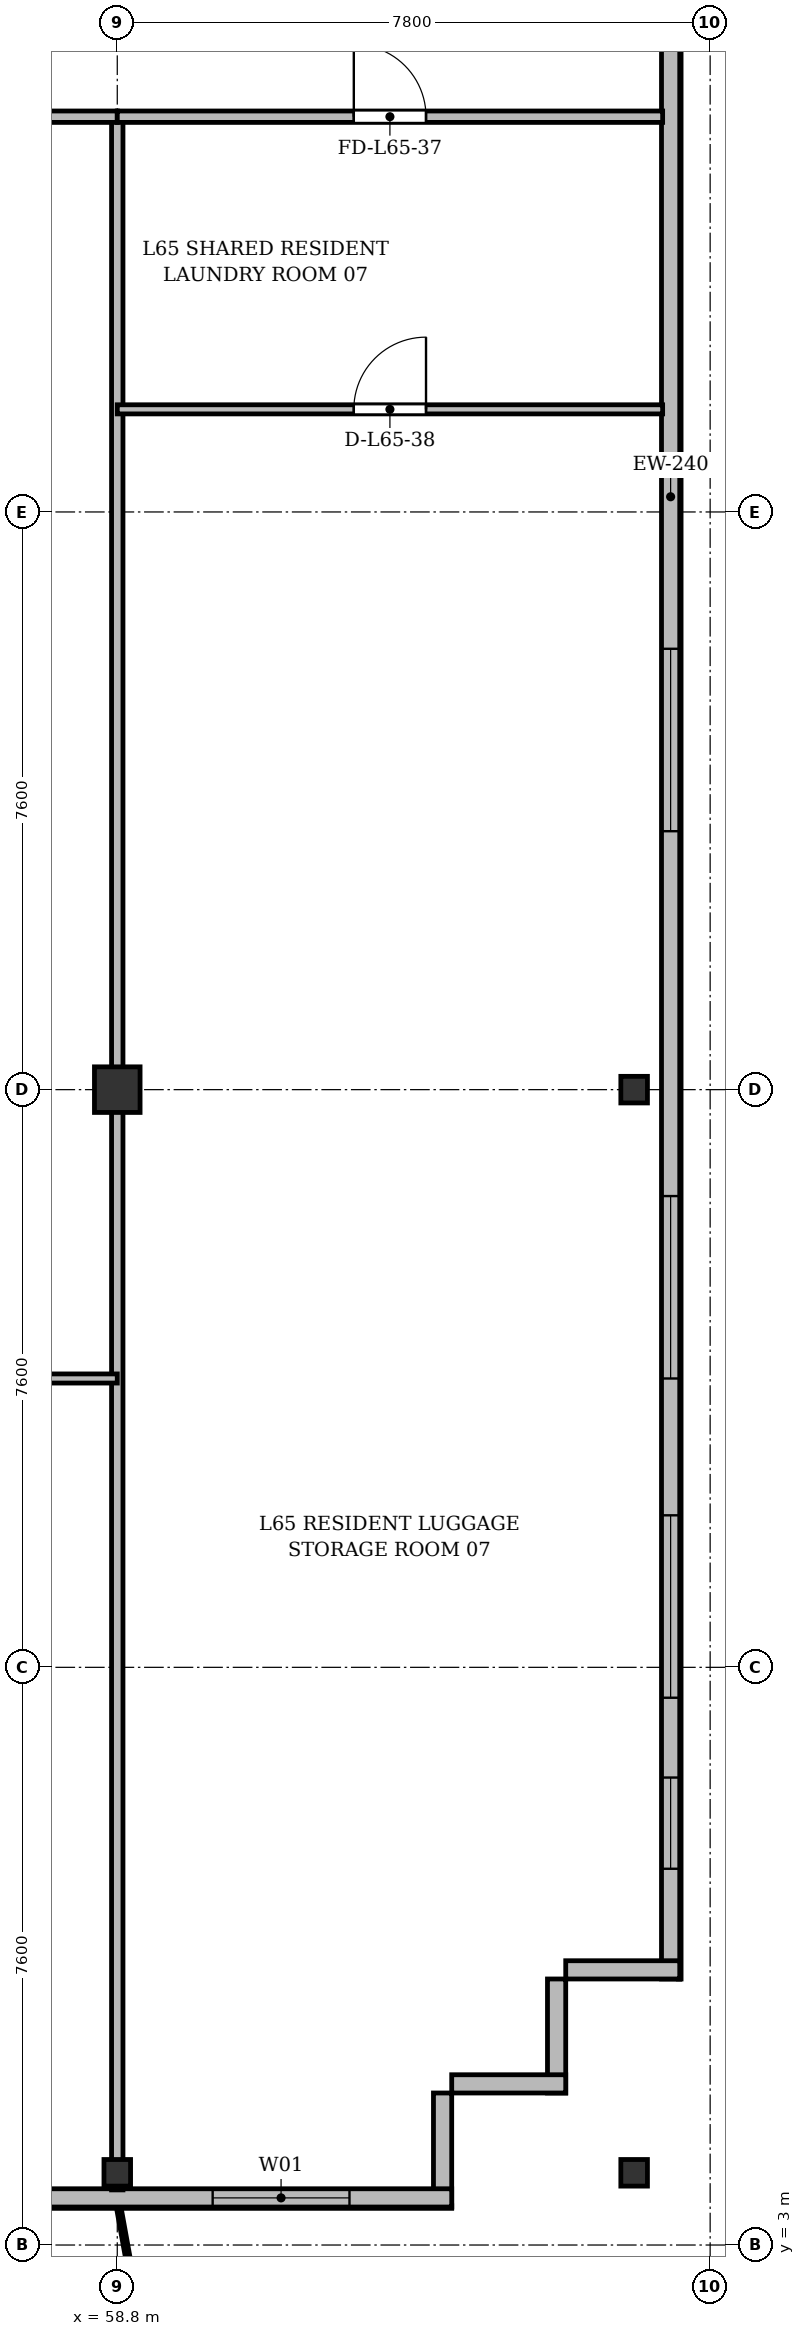
"""IFC4 building model, lengths in metres.
Left out: names, types, materials, properties, quantities, classifications, styles, units other than length and angle.
Written with IfcOpenShell. Run it as: python <this file> out.ifc"""

import sys

from ifc_helpers import new_model, si_unit, direction, frame, frame_2d, origin, origin_2d, place, context, subcontext, project, spatial, rectangle, i_section, extrude, source, transform, mapped, element, fill, save


model = new_model("IFC4")
c1 = context("Model", 3, precision=1e-05, world=origin(), true_north=direction((0.0, 1.0)))
c2 = subcontext(c1, "Body", "Model", "MODEL_VIEW")
j1 = project(units=[si_unit("LENGTHUNIT", "METRE"), si_unit("PLANEANGLEUNIT", "RADIAN")], contexts=[c1])
p1 = place(None, origin())
s1 = spatial("IfcSite", under=j1, at=p1, CompositionType="ELEMENT")
p2 = place(p1, origin())
s2 = spatial("IfcBuilding", under=s1, at=p2, CompositionType="ELEMENT")
p3 = place(p2, frame((0.0, 0.0, 252.3)))
s3 = spatial("IfcBuildingStorey", under=s2, at=p3, CompositionType="ELEMENT", Elevation=252.3)
m1 = source(origin(), c2, "Body", "SweptSolid", [
    extrude(i_section(OverallWidth=0.35, OverallDepth=0.35, WebThickness=0.018, FlangeThickness=0.028, at=origin_2d()), origin(), (0.0, 0.0, 1.0), 3.6),
])
p4 = place(p3, frame((58.8, 3.95, 0.0), z_axis=(0.0, 0.0, 1.0), x_axis=(1.0, 0.0, 0.0)))
e1 = element("IfcColumn", 1, at=p4, inside=s3, PredefinedType="COLUMN", context=c2, shape_type="MappedRepresentation", body=[
    mapped(m1, transform((0.0, 0.0, 0.0), x_axis=(1.0, 0.0, 0.0), y_axis=(0.0, 1.0, 0.0), z_axis=(0.0, 0.0, 1.0), scale=1.0)),
])
m2 = source(origin(), c2, "Body", "SweptSolid", [
    extrude(rectangle(XDim=0.6, YDim=0.6, at=origin_2d()), origin(), (0.0, 0.0, 1.0), 3.6),
])
p5 = place(p3, frame((58.8, 18.2, 0.0), z_axis=(0.0, 0.0, 1.0), x_axis=(1.0, 0.0, 0.0)))
e2 = element("IfcColumn", 2, at=p5, inside=s3, PredefinedType="COLUMN", context=c2, shape_type="MappedRepresentation", body=[
    mapped(m2, transform((0.0, 0.0, 0.0), x_axis=(1.0, 0.0, 0.0), y_axis=(0.0, 1.0, 0.0), z_axis=(0.0, 0.0, 1.0), scale=1.0)),
])
for number, where, z_axis, x_axis in (
    (3, (65.6, 3.95, 0.0), (0.0, 0.0, 1.0), (1.0, 0.0, 0.0)),
    (4, (65.6, 18.2, 0.0), (0.0, 0.0, 1.0), (1.0, 0.0, 0.0)),
):
    element("IfcColumn", number, at=place(p3, frame(where, z_axis=z_axis, x_axis=x_axis)), inside=s3, PredefinedType="COLUMN", context=c2, shape_type="MappedRepresentation", body=[
        mapped(m1, transform((0.0, 0.0, 0.0), x_axis=(1.0, 0.0, 0.0), y_axis=(0.0, 1.0, 0.0), z_axis=(0.0, 0.0, 1.0), scale=1.0)),
    ])
p6 = place(p3, frame((66.08, 45.5, 0.0), z_axis=(0.0, 0.0, 1.0), x_axis=(0.0, -1.0, 0.0)))
e5 = element("IfcWall", 5, at=p6, inside=s3, PredefinedType="SOLIDWALL", context=c2, shape_type="SweptSolid", body=[
    extrude(rectangle(XDim=39.0, YDim=0.24, at=frame_2d((19.5, 0.0))), origin(), (0.0, 0.0, 1.0), 3.37),
])
p7 = place(p6, frame((36.35, 0.0, 0.92)))
e6 = element("IfcOpeningElement", 6, at=p7, cuts=e5, PredefinedType="OPENING", context=c2, shape_type="SweptSolid", body=[
    extrude(rectangle(XDim=1.2, YDim=1.65, at=frame_2d((0.6, 0.825))), frame((0.0, 0.13, 0.0), z_axis=(0.0, -1.0, 0.0), x_axis=(1.0, 0.0, 0.0)), (0.0, 0.0, 1.0), 0.26),
])
p8 = place(p6, frame((32.9, 0.0, 0.92)))
e7 = element("IfcOpeningElement", 7, at=p8, cuts=e5, PredefinedType="OPENING", context=c2, shape_type="SweptSolid", body=[
    extrude(rectangle(XDim=2.4, YDim=2.1, at=frame_2d((1.2, 1.05))), frame((0.0, 0.13, 0.0), z_axis=(0.0, -1.0, 0.0), x_axis=(1.0, 0.0, 0.0)), (0.0, 0.0, 1.0), 0.26),
])
p9 = place(p6, frame((28.7, 0.0, 0.92)))
e8 = element("IfcOpeningElement", 8, at=p9, cuts=e5, PredefinedType="OPENING", context=c2, shape_type="SweptSolid", body=[
    extrude(rectangle(XDim=2.4, YDim=2.1, at=frame_2d((1.2, 1.05))), frame((0.0, 0.13, 0.0), z_axis=(0.0, -1.0, 0.0), x_axis=(1.0, 0.0, 0.0)), (0.0, 0.0, 1.0), 0.26),
])
p10 = place(p6, frame((21.5, 0.0, 0.92)))
e9 = element("IfcOpeningElement", 9, at=p10, cuts=e5, PredefinedType="OPENING", context=c2, shape_type="SweptSolid", body=[
    extrude(rectangle(XDim=2.4, YDim=2.1, at=frame_2d((1.2, 1.05))), frame((0.0, 0.13, 0.0), z_axis=(0.0, -1.0, 0.0), x_axis=(1.0, 0.0, 0.0)), (0.0, 0.0, 1.0), 0.26),
])
p11 = place(p6, frame((7.5, 0.0, 0.92)))
e10 = element("IfcOpeningElement", 10, at=p11, cuts=e5, PredefinedType="OPENING", context=c2, shape_type="SweptSolid", body=[
    extrude(rectangle(XDim=2.4, YDim=2.1, at=frame_2d((1.2, 1.05))), frame((0.0, 0.13, 0.0), z_axis=(0.0, -1.0, 0.0), x_axis=(1.0, 0.0, 0.0)), (0.0, 0.0, 1.0), 0.26),
])
p12 = place(p6, frame((4.5, 0.0, 0.92)))
e11 = element("IfcOpeningElement", 11, at=p12, cuts=e5, PredefinedType="OPENING", context=c2, shape_type="SweptSolid", body=[
    extrude(rectangle(XDim=1.2, YDim=1.65, at=frame_2d((0.6, 0.825))), frame((0.0, 0.13, 0.0), z_axis=(0.0, -1.0, 0.0), x_axis=(1.0, 0.0, 0.0)), (0.0, 0.0, 1.0), 0.26),
])
p13 = place(p6, frame((1.15, 0.0, 0.92)))
e12 = element("IfcOpeningElement", 12, at=p13, cuts=e5, PredefinedType="OPENING", context=c2, shape_type="SweptSolid", body=[
    extrude(rectangle(XDim=1.2, YDim=1.65, at=frame_2d((0.6, 0.825))), frame((0.0, 0.13, 0.0), z_axis=(0.0, -1.0, 0.0), x_axis=(1.0, 0.0, 0.0)), (0.0, 0.0, 1.0), 0.26),
])
p14 = place(p3, frame((66.2, 6.62, 0.0), z_axis=(0.0, 0.0, 1.0), x_axis=(-1.0, 0.0, 0.0)))
e13 = element("IfcWall", 13, at=p14, inside=s3, PredefinedType="SOLIDWALL", context=c2, shape_type="SweptSolid", body=[
    extrude(rectangle(XDim=1.5, YDim=0.24, at=frame_2d((0.75, 0.0))), origin(), (0.0, 0.0, 1.0), 2.87),
])
for number, where, z_axis, x_axis in (
    (14, (64.58, 6.5, 0.0), (0.0, 0.0, 1.0), (0.0, -1.0, 0.0)),
    (15, (64.7, 5.12, 0.0), (0.0, 0.0, 1.0), (-1.0, 0.0, 0.0)),
):
    element("IfcWall", number, at=place(p3, frame(where, z_axis=z_axis, x_axis=x_axis)), inside=s3, PredefinedType="SOLIDWALL", context=c2, shape_type="SweptSolid", body=[
        extrude(rectangle(XDim=1.5, YDim=0.24, at=frame_2d((0.75, 0.0))), origin(), (0.0, 0.0, 1.0), 3.37),
    ])
p15 = place(p3, frame((63.08, 5.0, 0.0), z_axis=(0.0, 0.0, 1.0), x_axis=(0.0, -1.0, 0.0)))
e16 = element("IfcWall", 16, at=p15, inside=s3, PredefinedType="SOLIDWALL", context=c2, shape_type="SweptSolid", body=[
    extrude(rectangle(XDim=1.5, YDim=0.24, at=frame_2d((0.75, 0.0))), origin(), (0.0, 0.0, 1.0), 2.92),
])
p16 = place(p3, frame((63.2, 3.62, 0.0), z_axis=(0.0, 0.0, 1.0), x_axis=(-1.0, 0.0, 0.0)))
e17 = element("IfcWall", 17, at=p16, inside=s3, PredefinedType="SOLIDWALL", context=c2, shape_type="SweptSolid", body=[
    extrude(rectangle(XDim=52.0, YDim=0.24, at=frame_2d((26.0, 0.0))), origin(), (0.0, 0.0, 1.0), 3.37),
])
p17 = place(p16, frame((1.345, 0.0, 0.9)))
e18 = element("IfcOpeningElement", 18, at=p17, cuts=e17, PredefinedType="OPENING", context=c2, shape_type="SweptSolid", body=[
    extrude(rectangle(XDim=1.8, YDim=1.8, at=frame_2d((0.9, 0.9))), frame((0.0, 0.13, 0.0), z_axis=(0.0, -1.0, 0.0), x_axis=(1.0, 0.0, 0.0)), (0.0, 0.0, 1.0), 0.26),
])
p18 = place(p16, frame((7.2, 0.0, 0.9)))
e19 = element("IfcOpeningElement", 19, at=p18, cuts=e17, PredefinedType="OPENING", context=c2, shape_type="SweptSolid", body=[
    extrude(rectangle(XDim=2.2, YDim=1.8, at=frame_2d((1.1, 0.9))), frame((0.0, 0.13, 0.0), z_axis=(0.0, -1.0, 0.0), x_axis=(1.0, 0.0, 0.0)), (0.0, 0.0, 1.0), 0.26),
])
p19 = place(p16, frame((14.017, 0.0, 0.0)))
e20 = element("IfcOpeningElement", 20, at=p19, cuts=e17, PredefinedType="OPENING", context=c2, shape_type="SweptSolid", body=[
    extrude(rectangle(XDim=1.2, YDim=2.2, at=frame_2d((0.6, 1.1))), frame((0.0, 0.13, 0.0), z_axis=(0.0, -1.0, 0.0), x_axis=(1.0, 0.0, 0.0)), (0.0, 0.0, 1.0), 0.26),
])
p20 = place(p16, frame((25.0, 0.0, 0.9)))
e21 = element("IfcOpeningElement", 21, at=p20, cuts=e17, PredefinedType="OPENING", context=c2, shape_type="SweptSolid", body=[
    extrude(rectangle(XDim=2.0, YDim=1.95, at=frame_2d((1.0, 0.975))), frame((0.0, 0.13, 0.0), z_axis=(0.0, -1.0, 0.0), x_axis=(1.0, 0.0, 0.0)), (0.0, 0.0, 1.0), 0.26),
])
p21 = place(p16, frame((35.375, 0.0, 0.9)))
e22 = element("IfcOpeningElement", 22, at=p21, cuts=e17, PredefinedType="OPENING", context=c2, shape_type="SweptSolid", body=[
    extrude(rectangle(XDim=1.65, YDim=1.85, at=frame_2d((0.825, 0.925))), frame((0.0, 0.13, 0.0), z_axis=(0.0, -1.0, 0.0), x_axis=(1.0, 0.0, 0.0)), (0.0, 0.0, 1.0), 0.26),
])
p22 = place(p16, frame((45.302, 0.0, 0.0)))
e23 = element("IfcOpeningElement", 23, at=p22, cuts=e17, PredefinedType="OPENING", context=c2, shape_type="SweptSolid", body=[
    extrude(rectangle(XDim=1.2, YDim=2.2, at=frame_2d((0.6, 1.1))), frame((0.0, 0.13, 0.0), z_axis=(0.0, -1.0, 0.0), x_axis=(1.0, 0.0, 0.0)), (0.0, 0.0, 1.0), 0.26),
])
p23 = place(p16, frame((48.655, 0.0, 0.9)))
e24 = element("IfcOpeningElement", 24, at=p23, cuts=e17, PredefinedType="OPENING", context=c2, shape_type="SweptSolid", body=[
    extrude(rectangle(XDim=2.2, YDim=1.8, at=frame_2d((1.1, 0.9))), frame((0.0, 0.13, 0.0), z_axis=(0.0, -1.0, 0.0), x_axis=(1.0, 0.0, 0.0)), (0.0, 0.0, 1.0), 0.26),
])
p24 = place(p3, frame((58.8, 3.725, 0.0), z_axis=(0.0, 0.0, 1.0), x_axis=(0.0, 1.0, 0.0)))
e25 = element("IfcWall", 25, at=p24, inside=s3, PredefinedType="PARTITIONING", context=c2, shape_type="SweptSolid", body=[
    extrude(rectangle(XDim=27.275, YDim=0.15, at=frame_2d((13.637, 0.0))), origin(), (0.0, 0.0, 1.0), 2.87),
])
p25 = place(p3, frame((51.0, 31.0, 0.0), z_axis=(0.0, 0.0, 1.0), x_axis=(1.0, 0.0, 0.0)))
e26 = element("IfcWall", 26, at=p25, inside=s3, PredefinedType="PARTITIONING", context=c2, shape_type="SweptSolid", body=[
    extrude(rectangle(XDim=7.8, YDim=0.15, at=frame_2d((3.9, 0.0))), origin(), (0.0, 0.0, 1.0), 2.87),
])
p26 = place(p25, frame((3.333, 0.0, 0.0)))
e27 = element("IfcOpeningElement", 27, at=p26, cuts=e26, PredefinedType="OPENING", context=c2, shape_type="SweptSolid", body=[
    extrude(rectangle(XDim=0.95, YDim=2.15, at=frame_2d((0.475, 1.075))), frame((0.0, 0.085, 0.0), z_axis=(0.0, -1.0, 0.0), x_axis=(1.0, 0.0, 0.0)), (0.0, 0.0, 1.0), 0.17),
])
p27 = place(p3, frame((51.0, 14.4, 0.0), z_axis=(0.0, 0.0, 1.0), x_axis=(1.0, 0.0, 0.0)))
e28 = element("IfcWall", 28, at=p27, inside=s3, PredefinedType="PARTITIONING", context=c2, shape_type="SweptSolid", body=[
    extrude(rectangle(XDim=7.8, YDim=0.12, at=frame_2d((3.9, 0.0))), origin(), (0.0, 0.0, 1.0), 2.87),
])
p28 = place(p27, frame((3.333, 0.0, 0.0)))
e29 = element("IfcOpeningElement", 29, at=p28, cuts=e28, PredefinedType="OPENING", context=c2, shape_type="SweptSolid", body=[
    extrude(rectangle(XDim=0.95, YDim=2.15, at=frame_2d((0.475, 1.075))), frame((0.0, 0.07, 0.0), z_axis=(0.0, -1.0, 0.0), x_axis=(1.0, 0.0, 0.0)), (0.0, 0.0, 1.0), 0.14),
])
p29 = place(p3, frame((58.8, 31.0, 0.0), z_axis=(0.0, 0.0, 1.0), x_axis=(1.0, 0.0, 0.0)))
e30 = element("IfcWall", 30, at=p29, inside=s3, PredefinedType="PARTITIONING", context=c2, shape_type="SweptSolid", body=[
    extrude(rectangle(XDim=7.175, YDim=0.15, at=frame_2d((3.587, 0.0))), origin(), (0.0, 0.0, 1.0), 2.87),
])
p30 = place(p29, frame((3.112, 0.0, 0.0)))
e31 = element("IfcOpeningElement", 31, at=p30, cuts=e30, PredefinedType="OPENING", context=c2, shape_type="SweptSolid", body=[
    extrude(rectangle(XDim=0.95, YDim=2.15, at=frame_2d((0.475, 1.075))), frame((0.0, 0.085, 0.0), z_axis=(0.0, -1.0, 0.0), x_axis=(1.0, 0.0, 0.0)), (0.0, 0.0, 1.0), 0.17),
])
p31 = place(p3, frame((58.8, 27.15, 0.0), z_axis=(0.0, 0.0, 1.0), x_axis=(1.0, 0.0, 0.0)))
e32 = element("IfcWall", 32, at=p31, inside=s3, PredefinedType="PARTITIONING", context=c2, shape_type="SweptSolid", body=[
    extrude(rectangle(XDim=7.175, YDim=0.12, at=frame_2d((3.587, 0.0))), origin(), (0.0, 0.0, 1.0), 2.87),
])
p32 = place(p31, frame((3.112, 0.0, 0.0)))
e33 = element("IfcOpeningElement", 33, at=p32, cuts=e32, PredefinedType="OPENING", context=c2, shape_type="SweptSolid", body=[
    extrude(rectangle(XDim=0.95, YDim=2.15, at=frame_2d((0.475, 1.075))), frame((0.0, 0.07, 0.0), z_axis=(0.0, -1.0, 0.0), x_axis=(1.0, 0.0, 0.0)), (0.0, 0.0, 1.0), 0.14),
])
m3 = source(origin(), c2, "Body", "SweptSolid", [
    extrude(rectangle(XDim=1.2, YDim=1.65, at=frame_2d((0.6, 0.825))), frame((0.0, 0.03, 0.0), z_axis=(0.0, -1.0, 0.0), x_axis=(1.0, 0.0, 0.0)), (0.0, 0.0, 1.0), 0.06),
])
p33 = place(p7, origin())
e34 = element("IfcWindow", 34, at=p33, inside=s3, PartitioningType="SINGLE_PANEL", PredefinedType="WINDOW", context=c2, shape_type="MappedRepresentation", body=[
    mapped(m3, transform((0.0, 0.0, 0.0), x_axis=(1.0, 0.0, 0.0), y_axis=(0.0, 1.0, 0.0), z_axis=(0.0, 0.0, 1.0), scale=1.0)),
])
fill(e6, e34)
m4 = source(origin(), c2, "Body", "SweptSolid", [
    extrude(rectangle(XDim=2.4, YDim=2.1, at=frame_2d((1.2, 1.05))), frame((0.0, 0.03, 0.0), z_axis=(0.0, -1.0, 0.0), x_axis=(1.0, 0.0, 0.0)), (0.0, 0.0, 1.0), 0.06),
])
p34 = place(p8, origin())
e35 = element("IfcWindow", 35, at=p34, inside=s3, PartitioningType="SINGLE_PANEL", PredefinedType="WINDOW", context=c2, shape_type="MappedRepresentation", body=[
    mapped(m4, transform((0.0, 0.0, 0.0), x_axis=(1.0, 0.0, 0.0), y_axis=(0.0, 1.0, 0.0), z_axis=(0.0, 0.0, 1.0), scale=1.0)),
])
fill(e7, e35)
p35 = place(p9, origin())
e36 = element("IfcWindow", 36, at=p35, inside=s3, PartitioningType="SINGLE_PANEL", PredefinedType="WINDOW", context=c2, shape_type="MappedRepresentation", body=[
    mapped(m4, transform((0.0, 0.0, 0.0), x_axis=(1.0, 0.0, 0.0), y_axis=(0.0, 1.0, 0.0), z_axis=(0.0, 0.0, 1.0), scale=1.0)),
])
fill(e8, e36)
p36 = place(p10, origin())
e37 = element("IfcWindow", 37, at=p36, inside=s3, PartitioningType="SINGLE_PANEL", PredefinedType="WINDOW", context=c2, shape_type="MappedRepresentation", body=[
    mapped(m4, transform((0.0, 0.0, 0.0), x_axis=(1.0, 0.0, 0.0), y_axis=(0.0, 1.0, 0.0), z_axis=(0.0, 0.0, 1.0), scale=1.0)),
])
fill(e9, e37)
m5 = source(origin(), c2, "Body", "SweptSolid", [
    extrude(rectangle(XDim=1.8, YDim=1.8, at=frame_2d((0.9, 0.9))), frame((0.0, 0.03, 0.0), z_axis=(0.0, -1.0, 0.0), x_axis=(1.0, 0.0, 0.0)), (0.0, 0.0, 1.0), 0.06),
])
p37 = place(p17, origin())
e38 = element("IfcWindow", 38, at=p37, inside=s3, PartitioningType="SINGLE_PANEL", PredefinedType="WINDOW", context=c2, shape_type="MappedRepresentation", body=[
    mapped(m5, transform((0.0, 0.0, 0.0), x_axis=(1.0, 0.0, 0.0), y_axis=(0.0, 1.0, 0.0), z_axis=(0.0, 0.0, 1.0), scale=1.0)),
])
fill(e18, e38)
m6 = source(origin(), c2, "Body", "SweptSolid", [
    extrude(rectangle(XDim=0.95, YDim=2.15, at=frame_2d((0.475, 1.075))), frame((0.0, 0.025, 0.0), z_axis=(0.0, -1.0, 0.0), x_axis=(1.0, 0.0, 0.0)), (0.0, 0.0, 1.0), 0.05),
])
p38 = place(p30, origin())
e39 = element("IfcDoor", 39, at=p38, inside=s3, OperationType="SINGLE_SWING_LEFT", PredefinedType="DOOR", context=c2, shape_type="MappedRepresentation", body=[
    mapped(m6, transform((0.0, 0.0, 0.0), x_axis=(1.0, 0.0, 0.0), y_axis=(0.0, 1.0, 0.0), z_axis=(0.0, 0.0, 1.0), scale=1.0)),
])
fill(e31, e39)
p39 = place(p32, origin())
e40 = element("IfcDoor", 40, at=p39, inside=s3, OperationType="SINGLE_SWING_RIGHT", PredefinedType="DOOR", context=c2, shape_type="MappedRepresentation", body=[
    mapped(m6, transform((0.0, 0.0, 0.0), x_axis=(1.0, 0.0, 0.0), y_axis=(0.0, 1.0, 0.0), z_axis=(0.0, 0.0, 1.0), scale=1.0)),
])
fill(e33, e40)
save(model, sys.argv[1])
